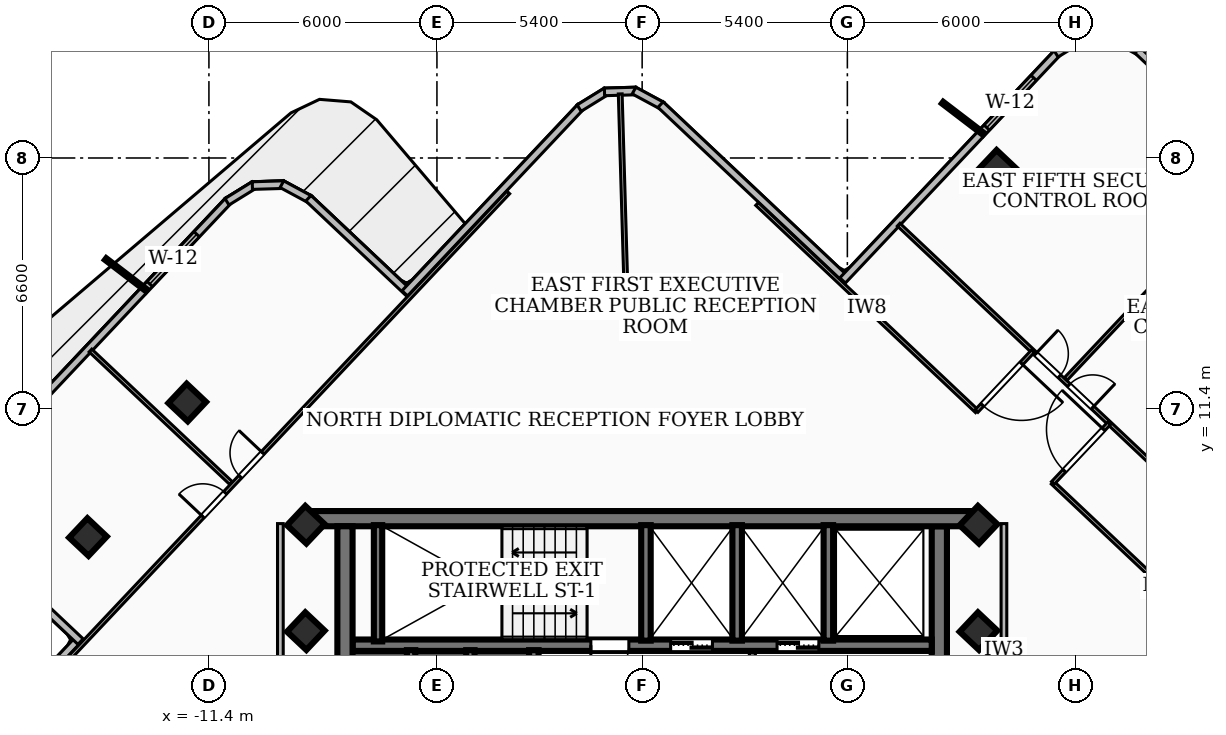
"""IFC4 building model, lengths in metres.
Left out: names, types, materials, properties, quantities, classifications, styles, units other than length and angle.
Written with IfcOpenShell. Run it as: python <this file> out.ifc"""

import sys

from ifc_helpers import new_model, si_unit, direction, frame, frame_2d, origin, origin_2d, place, context, subcontext, project, spatial, rectangle, extrude, element, fill, save


model = new_model("IFC4")
c1 = context("Model", 3, precision=1e-05, world=origin(), true_north=direction((0.0, 1.0)))
c2 = subcontext(c1, "Body", "Model", "MODEL_VIEW")
j1 = project(units=[si_unit("LENGTHUNIT", "METRE"), si_unit("PLANEANGLEUNIT", "RADIAN")], contexts=[c1])
p1 = place(None, origin())
s1 = spatial("IfcSite", under=j1, at=p1, CompositionType="ELEMENT")
p2 = place(p1, origin())
s2 = spatial("IfcBuilding", under=s1, at=p2, CompositionType="ELEMENT")
p3 = place(p2, frame((0.0, 0.0, 244.08)))
s3 = spatial("IfcBuildingStorey", under=s2, at=p3, CompositionType="ELEMENT", Elevation=244.08)
p4 = place(p3, frame((-8.78, 8.51, 0.0), z_axis=(0.0, 0.0, 1.0), x_axis=(1.0, 0.0, 0.0)))
e1 = element("IfcWall", 1, at=p4, inside=s3, PredefinedType="SHEAR", context=c2, shape_type="SweptSolid", body=[
    extrude(rectangle(XDim=17.56, YDim=0.4, at=frame_2d((8.78, 0.0))), origin(), (0.0, 0.0, 1.0), 3.16),
])
for number, where, z_axis, x_axis in (
    (2, (-7.82, 1.95, 0.0), (0.0, 0.0, 1.0), (0.0, 1.0, 0.0)),
    (3, (7.82, 8.31, 0.0), (0.0, 0.0, 1.0), (0.0, -1.0, 0.0)),
):
    element("IfcWall", number, at=place(p3, frame(where, z_axis=z_axis, x_axis=x_axis)), inside=s3, PredefinedType="SHEAR", context=c2, shape_type="SweptSolid", body=[
        extrude(rectangle(XDim=6.36, YDim=0.4, at=frame_2d((3.18, 0.0))), origin(), (0.0, 0.0, 1.0), 3.16),
    ])
p5 = place(p3, frame((7.62, 5.18, 0.0), z_axis=(0.0, 0.0, 1.0), x_axis=(-1.0, 0.0, 0.0)))
e4 = element("IfcWall", 4, at=p5, inside=s3, PredefinedType="SOLIDWALL", context=c2, shape_type="SweptSolid", body=[
    extrude(rectangle(XDim=15.24, YDim=0.3, at=frame_2d((7.62, 0.0))), origin(), (0.0, 0.0, 1.0), 3.16),
])
p6 = place(p5, frame((5.77, 0.0, 0.0)))
e5 = element("IfcOpeningElement", 5, at=p6, cuts=e4, PredefinedType="OPENING", context=c2, shape_type="SweptSolid", body=[
    extrude(rectangle(XDim=1.1, YDim=2.15, at=frame_2d((0.55, 1.075))), frame((0.0, 0.16, 0.0), z_axis=(0.0, -1.0, 0.0), x_axis=(1.0, 0.0, 0.0)), (0.0, 0.0, 1.0), 0.32),
])
p7 = place(p5, frame((2.97, 0.0, 0.0)))
e6 = element("IfcOpeningElement", 6, at=p7, cuts=e4, PredefinedType="OPENING", context=c2, shape_type="SweptSolid", body=[
    extrude(rectangle(XDim=1.1, YDim=2.15, at=frame_2d((0.55, 1.075))), frame((0.0, 0.16, 0.0), z_axis=(0.0, -1.0, 0.0), x_axis=(1.0, 0.0, 0.0)), (0.0, 0.0, 1.0), 0.32),
])
p8 = place(p5, frame((7.97, 0.0, 0.0)))
e7 = element("IfcOpeningElement", 7, at=p8, cuts=e4, PredefinedType="OPENING", context=c2, shape_type="SweptSolid", body=[
    extrude(rectangle(XDim=1.0, YDim=2.1, at=frame_2d((0.5, 1.05))), frame((0.0, 0.16, 0.0), z_axis=(0.0, -1.0, 0.0), x_axis=(1.0, 0.0, 0.0)), (0.0, 0.0, 1.0), 0.32),
])
p9 = place(p3, frame((-6.95, 5.28, 0.0), z_axis=(0.0, 0.0, 1.0), x_axis=(0.0, 1.0, 0.0)))
e8 = element("IfcWall", 8, at=p9, inside=s3, PredefinedType="SOLIDWALL", context=c2, shape_type="SweptSolid", body=[
    extrude(rectangle(XDim=3.06, YDim=0.22, at=frame_2d((1.53, 0.0))), origin(), (0.0, 0.0, 1.0), 3.16),
])
for number, where, z_axis, x_axis in (
    (9, (0.1, 5.3, 0.0), (0.0, 0.0, 1.0), (0.0, 1.0, 0.0)),
    (10, (2.5, 5.3, 0.0), (0.0, 0.0, 1.0), (0.0, 1.0, 0.0)),
    (11, (4.9, 5.3, 0.0), (0.0, 0.0, 1.0), (0.0, 1.0, 0.0)),
):
    element("IfcWall", number, at=place(p3, frame(where, z_axis=z_axis, x_axis=x_axis)), inside=s3, PredefinedType="SOLIDWALL", context=c2, shape_type="SweptSolid", body=[
        extrude(rectangle(XDim=3.04, YDim=0.25, at=frame_2d((1.52, 0.0))), origin(), (0.0, 0.0, 1.0), 3.16),
    ])
p10 = place(p3, frame((-2.85, 1.98, 0.0), z_axis=(0.0, 0.0, 1.0), x_axis=(0.0, 1.0, 0.0)))
e12 = element("IfcWall", 12, at=p10, inside=s3, PredefinedType="SOLIDWALL", context=c2, shape_type="SweptSolid", body=[
    extrude(rectangle(XDim=3.07, YDim=0.25, at=frame_2d((1.535, 0.0))), origin(), (0.0, 0.0, 1.0), 3.16),
])
for number, where, z_axis, x_axis in (
    (13, (-6.08, 1.98, 0.0), (0.0, 0.0, 1.0), (0.0, 1.0, 0.0)),
    (14, (-4.52, 1.98, 0.0), (0.0, 0.0, 1.0), (0.0, 1.0, 0.0)),
):
    element("IfcWall", number, at=place(p3, frame(where, z_axis=z_axis, x_axis=x_axis)), inside=s3, PredefinedType="SOLIDWALL", context=c2, shape_type="SweptSolid", body=[
        extrude(rectangle(XDim=3.07, YDim=0.22, at=frame_2d((1.535, 0.0))), origin(), (0.0, 0.0, 1.0), 3.16),
    ])
for number, where, z_axis, x_axis in (
    (15, (-8.85, 5.55, 0.0), (0.0, 0.0, 1.0), (0.686, 0.728, 0.0)),
    (16, (8.85, 5.55, 0.0), (0.0, 0.0, 1.0), (0.686, 0.728, 0.0)),
    (17, (-8.85, 8.35, 0.0), (0.0, 0.0, 1.0), (0.686, 0.728, 0.0)),
    (18, (8.85, 8.35, 0.0), (0.0, 0.0, 1.0), (0.686, 0.728, 0.0)),
    (19, (9.341, 17.714, 0.0), (0.0, 0.0, 1.0), (0.686, 0.728, 0.0)),
    (20, (-11.971, 11.566, 0.0), (0.0, 0.0, 1.0), (0.686, 0.728, 0.0)),
    (21, (-14.583, 8.026, 0.0), (0.0, 0.0, 1.0), (0.686, 0.728, 0.0)),
):
    element("IfcColumn", number, at=place(p3, frame(where, z_axis=z_axis, x_axis=x_axis)), inside=s3, PredefinedType="COLUMN", context=c2, shape_type="SweptSolid", body=[
        extrude(rectangle(XDim=0.7, YDim=0.7, at=origin_2d()), origin(), (0.0, 0.0, 1.0), 3.42),
    ])
p11 = place(p3, frame((-19.405, 0.484, 0.0), z_axis=(0.0, 0.0, 1.0), x_axis=(0.686028756372, 0.727574426042, 0.0)))
e22 = element("IfcWall", 22, at=p11, inside=s3, PredefinedType="SOLIDWALL", context=c2, shape_type="SweptSolid", body=[
    extrude(rectangle(XDim=6.74, YDim=0.2, at=frame_2d((3.37, 0.0))), origin(), (0.0, 0.0, 1.0), 3.16),
])
p12 = place(p3, frame((-14.778, 5.275, 0.0), z_axis=(0.0, 0.0, 1.0), x_axis=(-0.727262285553, 0.686359649172, 0.0)))
e23 = element("IfcWall", 23, at=p12, inside=s3, PredefinedType="SOLIDWALL", context=c2, shape_type="SweptSolid", body=[
    extrude(rectangle(XDim=3.641, YDim=0.2, at=frame_2d((1.82, 0.0))), origin(), (0.0, 0.0, 1.0), 3.16),
])
p13 = place(p3, frame((-17.488, 9.878, 0.0), z_axis=(0.0, 0.0, 1.0), x_axis=(0.686075032126, 0.727530789928, 0.0)))
e24 = element("IfcWall", 24, at=p13, inside=s3, PredefinedType="SOLIDWALL", context=c2, shape_type="SweptSolid", body=[
    extrude(rectangle(XDim=9.623, YDim=0.2, at=frame_2d((4.812, 0.0))), origin(), (0.0, 0.0, 1.0), 3.16),
])
p14 = place(p13, frame((6.606, 0.0, 0.85)))
e25 = element("IfcOpeningElement", 25, at=p14, cuts=e24, PredefinedType="OPENING", context=c2, shape_type="SweptSolid", body=[
    extrude(rectangle(XDim=1.8, YDim=1.6, at=frame_2d((0.9, 0.8))), frame((0.0, 0.11, 0.0), z_axis=(0.0, -1.0, 0.0), x_axis=(1.0, 0.0, 0.0)), (0.0, 0.0, 1.0), 0.22),
])
p15 = place(p3, frame((-10.924, 16.848, 0.0), z_axis=(0.0, 0.0, 1.0), x_axis=(0.850947362812, 0.525250974033, 0.0)))
e26 = element("IfcWall", 26, at=p15, inside=s3, PredefinedType="SOLIDWALL", context=c2, shape_type="SweptSolid", body=[
    extrude(rectangle(XDim=0.838, YDim=0.2, at=frame_2d((0.419, 0.0))), origin(), (0.0, 0.0, 1.0), 3.16),
])
p16 = place(p3, frame((-10.257, 17.274, 0.0), z_axis=(0.0, 0.0, 1.0), x_axis=(0.999534635062, 0.03050431627, 0.0)))
e27 = element("IfcWall", 27, at=p16, inside=s3, PredefinedType="SOLIDWALL", context=c2, shape_type="SweptSolid", body=[
    extrude(rectangle(XDim=0.824, YDim=0.2, at=frame_2d((0.412, 0.0))), origin(), (0.0, 0.0, 1.0), 3.16),
])
p17 = place(p3, frame((-9.48, 17.31, 0.0), z_axis=(0.0, 0.0, 1.0), x_axis=(0.880199822755, -0.474603278561, 0.0)))
e28 = element("IfcWall", 28, at=p17, inside=s3, PredefinedType="SOLIDWALL", context=c2, shape_type="SweptSolid", body=[
    extrude(rectangle(XDim=0.838, YDim=0.2, at=frame_2d((0.419, 0.0))), origin(), (0.0, 0.0, 1.0), 3.16),
])
p18 = place(p3, frame((-8.782, 16.941, 0.0), z_axis=(0.0, 0.0, 1.0), x_axis=(0.727388601412, -0.686225781019, 0.0)))
e29 = element("IfcWall", 29, at=p18, inside=s3, PredefinedType="SOLIDWALL", context=c2, shape_type="SweptSolid", body=[
    extrude(rectangle(XDim=3.642, YDim=0.2, at=frame_2d((1.821, 0.0))), origin(), (0.0, 0.0, 1.0), 3.16),
])
p19 = place(p3, frame((-6.246, 14.439, 0.0), z_axis=(0.0, 0.0, 1.0), x_axis=(0.686109803758, 0.727497998064, 0.0)))
e30 = element("IfcWall", 30, at=p19, inside=s3, PredefinedType="SOLIDWALL", context=c2, shape_type="SweptSolid", body=[
    extrude(rectangle(XDim=6.742, YDim=0.2, at=frame_2d((3.371, 0.0))), origin(), (0.0, 0.0, 1.0), 3.16),
])
p20 = place(p3, frame((-1.658, 19.313, 0.0), z_axis=(0.0, 0.0, 1.0), x_axis=(0.850997215859, 0.52517019965, 0.0)))
e31 = element("IfcWall", 31, at=p20, inside=s3, PredefinedType="SOLIDWALL", context=c2, shape_type="SweptSolid", body=[
    extrude(rectangle(XDim=0.838, YDim=0.2, at=frame_2d((0.419, 0.0))), origin(), (0.0, 0.0, 1.0), 3.16),
])
p21 = place(p3, frame((-0.991, 19.739, 0.0), z_axis=(0.0, 0.0, 1.0), x_axis=(0.999578691641, 0.029024803491, 0.0)))
e32 = element("IfcWall", 32, at=p21, inside=s3, PredefinedType="SOLIDWALL", context=c2, shape_type="SweptSolid", body=[
    extrude(rectangle(XDim=0.824, YDim=0.2, at=frame_2d((0.412, 0.0))), origin(), (0.0, 0.0, 1.0), 3.16),
])
p22 = place(p3, frame((-0.214, 19.774, 0.0), z_axis=(0.0, 0.0, 1.0), x_axis=(0.880199822755, -0.474603278561, 0.0)))
e33 = element("IfcWall", 33, at=p22, inside=s3, PredefinedType="SOLIDWALL", context=c2, shape_type="SweptSolid", body=[
    extrude(rectangle(XDim=0.838, YDim=0.2, at=frame_2d((0.419, 0.0))), origin(), (0.0, 0.0, 1.0), 3.16),
])
p23 = place(p3, frame((0.484, 19.405, 0.0), z_axis=(0.0, 0.0, 1.0), x_axis=(0.727574426042, -0.686028756372, 0.0)))
e34 = element("IfcWall", 34, at=p23, inside=s3, PredefinedType="SOLIDWALL", context=c2, shape_type="SweptSolid", body=[
    extrude(rectangle(XDim=6.74, YDim=0.2, at=frame_2d((3.37, 0.0))), origin(), (0.0, 0.0, 1.0), 3.16),
])
p24 = place(p3, frame((5.275, 14.778, 0.0), z_axis=(0.0, 0.0, 1.0), x_axis=(0.686187598971, 0.72742462085, 0.0)))
e35 = element("IfcWall", 35, at=p24, inside=s3, PredefinedType="SOLIDWALL", context=c2, shape_type="SweptSolid", body=[
    extrude(rectangle(XDim=8.241, YDim=0.2, at=frame_2d((4.121, 0.0))), origin(), (0.0, 0.0, 1.0), 3.16),
])
p25 = place(p24, frame((5.528, 0.0, 0.85)))
e36 = element("IfcOpeningElement", 36, at=p25, cuts=e35, PredefinedType="OPENING", context=c2, shape_type="SweptSolid", body=[
    extrude(rectangle(XDim=1.8, YDim=1.6, at=frame_2d((0.9, 0.8))), frame((0.0, 0.11, 0.0), z_axis=(0.0, -1.0, 0.0), x_axis=(1.0, 0.0, 0.0)), (0.0, 0.0, 1.0), 0.22),
])
p26 = place(p3, frame((10.892, 20.742, 0.0), z_axis=(0.0, 0.0, 1.0), x_axis=(0.850997215859, 0.52517019965, 0.0)))
e37 = element("IfcWall", 37, at=p26, inside=s3, PredefinedType="SOLIDWALL", context=c2, shape_type="SweptSolid", body=[
    extrude(rectangle(XDim=0.838, YDim=0.2, at=frame_2d((0.419, 0.0))), origin(), (0.0, 0.0, 1.0), 3.16),
])
p27 = place(p3, frame((12.336, 21.204, 0.0), z_axis=(0.0, 0.0, 1.0), x_axis=(0.880078176624, -0.474828814447, 0.0)))
e38 = element("IfcWall", 38, at=p27, inside=s3, PredefinedType="SOLIDWALL", context=c2, shape_type="SweptSolid", body=[
    extrude(rectangle(XDim=0.839, YDim=0.2, at=frame_2d((0.419, 0.0))), origin(), (0.0, 0.0, 1.0), 3.16),
])
p28 = place(p3, frame((13.034, 20.835, 0.0), z_axis=(0.0, 0.0, 1.0), x_axis=(0.727480137234, -0.686128741513, 0.0)))
e39 = element("IfcWall", 39, at=p28, inside=s3, PredefinedType="SOLIDWALL", context=c2, shape_type="SweptSolid", body=[
    extrude(rectangle(XDim=9.624, YDim=0.2, at=frame_2d((4.812, 0.0))), origin(), (0.0, 0.0, 1.0), 3.16),
])
p29 = place(p28, frame((6.306, 0.0, 0.85)))
e40 = element("IfcOpeningElement", 40, at=p29, cuts=e39, PredefinedType="OPENING", context=c2, shape_type="SweptSolid", body=[
    extrude(rectangle(XDim=2.4, YDim=2.1, at=frame_2d((1.2, 1.05))), frame((0.0, 0.11, 0.0), z_axis=(0.0, -1.0, 0.0), x_axis=(1.0, 0.0, 0.0)), (0.0, 0.0, 1.0), 0.22),
])
p30 = place(p3, frame((2.9, 2.04, 0.0), z_axis=(0.0, 0.0, 1.0), x_axis=(0.0, 1.0, 0.0)))
e41 = element("IfcWall", 41, at=p30, inside=s3, PredefinedType="PARTITIONING", context=c2, shape_type="SweptSolid", body=[
    extrude(rectangle(XDim=2.94, YDim=0.16, at=frame_2d((1.47, 0.0))), origin(), (0.0, 0.0, 1.0), 2.39),
])
p31 = place(p30, frame((1.82, 0.0, 0.0)))
e42 = element("IfcOpeningElement", 42, at=p31, cuts=e41, PredefinedType="OPENING", context=c2, shape_type="SweptSolid", body=[
    extrude(rectangle(XDim=0.9, YDim=2.06, at=frame_2d((0.45, 1.03))), frame((0.0, 0.09, 0.0), z_axis=(0.0, -1.0, 0.0), x_axis=(1.0, 0.0, 0.0)), (0.0, 0.0, 1.0), 0.18),
])
p32 = place(p3, frame((-9.52, 1.75, 0.0), z_axis=(0.0, 0.0, 1.0), x_axis=(0.0, 1.0, 0.0)))
e43 = element("IfcWall", 43, at=p32, inside=s3, PredefinedType="PARTITIONING", context=c2, shape_type="SweptSolid", body=[
    extrude(rectangle(XDim=6.63, YDim=0.15, at=frame_2d((3.315, 0.0))), origin(), (0.0, 0.0, 1.0), 2.53),
])
p33 = place(p3, frame((9.52, 1.75, 0.0), z_axis=(0.0, 0.0, 1.0), x_axis=(0.0, 1.0, 0.0)))
e44 = element("IfcWall", 44, at=p33, inside=s3, PredefinedType="PARTITIONING", context=c2, shape_type="SweptSolid", body=[
    extrude(rectangle(XDim=6.63, YDim=0.15, at=frame_2d((3.315, 0.0))), origin(), (0.0, 0.0, 1.0), 3.16),
])
p34 = place(p3, frame((-0.397, 13.54, 0.0), z_axis=(0.0, 0.0, 1.0), x_axis=(-0.029263699144, 0.999571726247, 0.0)))
e45 = element("IfcWall", 45, at=p34, inside=s3, PredefinedType="PARTITIONING", context=c2, shape_type="SweptSolid", body=[
    extrude(rectangle(XDim=6.149, YDim=0.1, at=frame_2d((3.074, 0.0))), origin(), (0.0, 0.0, 1.0), 3.16),
])
p35 = place(p3, frame((8.807, 11.336, 0.0), z_axis=(0.0, 0.0, 1.0), x_axis=(-0.727546923281, 0.68605792352, 0.0)))
e46 = element("IfcWall", 46, at=p35, inside=s3, PredefinedType="PARTITIONING", context=c2, shape_type="SweptSolid", body=[
    extrude(rectangle(XDim=7.95, YDim=0.1, at=frame_2d((3.975, 0.0))), origin(), (0.0, 0.0, 1.0), 3.16),
])
p36 = place(p3, frame((16.585, 4.002, 0.0), z_axis=(0.0, 0.0, 1.0), x_axis=(-0.727485611578, 0.686122937196, 0.0)))
e47 = element("IfcWall", 47, at=p36, inside=s3, PredefinedType="PARTITIONING", context=c2, shape_type="SweptSolid", body=[
    extrude(rectangle(XDim=7.951, YDim=0.1, at=frame_2d((3.975, 0.0))), origin(), (0.0, 0.0, 1.0), 3.16),
])
p37 = place(p3, frame((10.282, 12.915, 0.0), z_axis=(0.0, 0.0, 1.0), x_axis=(-0.685949623464, -0.727649032205, 0.0)))
e48 = element("IfcWall", 48, at=p37, inside=s3, PredefinedType="PARTITIONING", context=c2, shape_type="SweptSolid", body=[
    extrude(rectangle(XDim=2.16, YDim=0.1, at=frame_2d((1.08, 0.0))), origin(), (0.0, 0.0, 1.0), 2.53),
])
p38 = place(p37, frame((0.44, 0.0, 0.0)))
e49 = element("IfcOpeningElement", 49, at=p38, cuts=e48, PredefinedType="OPENING", context=c2, shape_type="SweptSolid", body=[
    extrude(rectangle(XDim=1.5, YDim=2.12, at=frame_2d((0.75, 1.06))), frame((0.0, 0.06, 0.0), z_axis=(0.0, -1.0, 0.0), x_axis=(1.0, 0.0, 0.0)), (0.0, 0.0, 1.0), 0.12),
])
p39 = place(p3, frame((10.808, 9.45, 0.0), z_axis=(0.0, 0.0, 1.0), x_axis=(0.686175284747, 0.727436236795, 0.0)))
e50 = element("IfcWall", 50, at=p39, inside=s3, PredefinedType="PARTITIONING", context=c2, shape_type="SweptSolid", body=[
    extrude(rectangle(XDim=2.16, YDim=0.1, at=frame_2d((1.08, 0.0))), origin(), (0.0, 0.0, 1.0), 3.16),
])
p40 = place(p39, frame((0.44, 0.0, 0.0)))
e51 = element("IfcOpeningElement", 51, at=p40, cuts=e50, PredefinedType="OPENING", context=c2, shape_type="SweptSolid", body=[
    extrude(rectangle(XDim=1.5, YDim=2.12, at=frame_2d((0.75, 1.06))), frame((0.0, 0.06, 0.0), z_axis=(0.0, -1.0, 0.0), x_axis=(1.0, 0.0, 0.0)), (0.0, 0.0, 1.0), 0.12),
])
p41 = place(p3, frame((11.145, 12.183, 0.0), z_axis=(0.0, 0.0, 1.0), x_axis=(0.686088923395, 0.727517689953, 0.0)))
e52 = element("IfcWall", 52, at=p41, inside=s3, PredefinedType="PARTITIONING", context=c2, shape_type="SweptSolid", body=[
    extrude(rectangle(XDim=7.525, YDim=0.1, at=frame_2d((3.763, 0.0))), origin(), (0.0, 0.0, 1.0), 3.16),
])
p42 = place(p3, frame((6.75, 16.246, 0.0), z_axis=(0.0, 0.0, 1.0), x_axis=(0.727488049341, -0.686120352464, 0.0)))
e53 = element("IfcWall", 53, at=p42, inside=s3, PredefinedType="PARTITIONING", context=c2, shape_type="SweptSolid", body=[
    extrude(rectangle(XDim=12.47, YDim=0.1, at=frame_2d((6.235, 0.0))), origin(), (0.0, 0.0, 1.0), 2.53),
])
p43 = place(p42, frame((6.155, 0.0, 0.0)))
e54 = element("IfcOpeningElement", 54, at=p43, cuts=e53, PredefinedType="OPENING", context=c2, shape_type="SweptSolid", body=[
    extrude(rectangle(XDim=0.86, YDim=2.04, at=frame_2d((0.43, 1.02))), frame((0.0, 0.06, 0.0), z_axis=(0.0, -1.0, 0.0), x_axis=(1.0, 0.0, 0.0)), (0.0, 0.0, 1.0), 0.12),
])
p44 = place(p42, frame((4.955, 0.0, 0.0)))
e55 = element("IfcOpeningElement", 55, at=p44, cuts=e53, PredefinedType="OPENING", context=c2, shape_type="SweptSolid", body=[
    extrude(rectangle(XDim=0.86, YDim=2.04, at=frame_2d((0.43, 1.02))), frame((0.0, 0.06, 0.0), z_axis=(0.0, -1.0, 0.0), x_axis=(1.0, 0.0, 0.0)), (0.0, 0.0, 1.0), 0.12),
])
p45 = place(p3, frame((-10.817, 9.445, 0.0), z_axis=(0.0, 0.0, 1.0), x_axis=(-0.727564075469, 0.686039733606, 0.0)))
e56 = element("IfcWall", 56, at=p45, inside=s3, PredefinedType="PARTITIONING", context=c2, shape_type="SweptSolid", body=[
    extrude(rectangle(XDim=5.086, YDim=0.1, at=frame_2d((2.543, 0.0))), origin(), (0.0, 0.0, 1.0), 3.16),
])
p46 = place(p3, frame((-17.271, 2.514, 0.0), z_axis=(0.0, 0.0, 1.0), x_axis=(0.686068145865, 0.727537283739, 0.0)))
e57 = element("IfcWall", 57, at=p46, inside=s3, PredefinedType="PARTITIONING", context=c2, shape_type="SweptSolid", body=[
    extrude(rectangle(XDim=20.04, YDim=0.1, at=frame_2d((10.02, 0.0))), origin(), (0.0, 0.0, 1.0), 2.53),
])
p47 = place(p46, frame((9.76, 0.0, 0.0)))
e58 = element("IfcOpeningElement", 58, at=p47, cuts=e57, PredefinedType="OPENING", context=c2, shape_type="SweptSolid", body=[
    extrude(rectangle(XDim=0.86, YDim=2.04, at=frame_2d((0.43, 1.02))), frame((0.0, 0.06, 0.0), z_axis=(0.0, -1.0, 0.0), x_axis=(1.0, 0.0, 0.0)), (0.0, 0.0, 1.0), 0.12),
])
p48 = place(p46, frame((8.32, 0.0, 0.0)))
e59 = element("IfcOpeningElement", 59, at=p48, cuts=e57, PredefinedType="OPENING", context=c2, shape_type="SweptSolid", body=[
    extrude(rectangle(XDim=0.86, YDim=2.04, at=frame_2d((0.43, 1.02))), frame((0.0, 0.06, 0.0), z_axis=(0.0, -1.0, 0.0), x_axis=(1.0, 0.0, 0.0)), (0.0, 0.0, 1.0), 0.12),
])
p49 = place(p14, origin())
e60 = element("IfcWindow", 60, at=p49, inside=s3, PartitioningType="SINGLE_PANEL", PredefinedType="WINDOW", context=c2, shape_type="SweptSolid", body=[
    extrude(rectangle(XDim=1.8, YDim=1.6, at=frame_2d((0.9, 0.8))), frame((0.0, 0.03, 0.0), z_axis=(0.0, -1.0, 0.0), x_axis=(1.0, 0.0, 0.0)), (0.0, 0.0, 1.0), 0.06),
])
fill(e25, e60)
p50 = place(p25, origin())
e61 = element("IfcWindow", 61, at=p50, inside=s3, PartitioningType="SINGLE_PANEL", PredefinedType="WINDOW", context=c2, shape_type="SweptSolid", body=[
    extrude(rectangle(XDim=1.8, YDim=1.6, at=frame_2d((0.9, 0.8))), frame((0.0, 0.03, 0.0), z_axis=(0.0, -1.0, 0.0), x_axis=(1.0, 0.0, 0.0)), (0.0, 0.0, 1.0), 0.06),
])
fill(e36, e61)
p51 = place(p6, origin())
e62 = element("IfcDoor", 62, at=p51, inside=s3, OperationType="DOUBLE_DOOR_SLIDING", PredefinedType="DOOR", context=c2, shape_type="SweptSolid", body=[
    extrude(rectangle(XDim=1.1, YDim=2.15, at=frame_2d((0.55, 1.075))), frame((0.0, 0.025, 0.0), z_axis=(0.0, -1.0, 0.0), x_axis=(1.0, 0.0, 0.0)), (0.0, 0.0, 1.0), 0.05),
])
fill(e5, e62)
p52 = place(p7, origin())
e63 = element("IfcDoor", 63, at=p52, inside=s3, OperationType="DOUBLE_DOOR_SLIDING", PredefinedType="DOOR", context=c2, shape_type="SweptSolid", body=[
    extrude(rectangle(XDim=1.1, YDim=2.15, at=frame_2d((0.55, 1.075))), frame((0.0, 0.025, 0.0), z_axis=(0.0, -1.0, 0.0), x_axis=(1.0, 0.0, 0.0)), (0.0, 0.0, 1.0), 0.05),
])
fill(e6, e63)
p53 = place(p8, origin())
e64 = element("IfcDoor", 64, at=p53, inside=s3, OperationType="SINGLE_SWING_RIGHT", PredefinedType="DOOR", context=c2, shape_type="SweptSolid", body=[
    extrude(rectangle(XDim=1.0, YDim=2.1, at=frame_2d((0.5, 1.05))), frame((0.0, 0.025, 0.0), z_axis=(0.0, -1.0, 0.0), x_axis=(1.0, 0.0, 0.0)), (0.0, 0.0, 1.0), 0.05),
])
fill(e7, e64)
p54 = place(p38, origin())
e65 = element("IfcDoor", 65, at=p54, inside=s3, OperationType="SINGLE_SWING_LEFT", PredefinedType="DOOR", context=c2, shape_type="SweptSolid", body=[
    extrude(rectangle(XDim=1.5, YDim=2.12, at=frame_2d((0.75, 1.06))), frame((0.0, 0.025, 0.0), z_axis=(0.0, -1.0, 0.0), x_axis=(1.0, 0.0, 0.0)), (0.0, 0.0, 1.0), 0.05),
])
fill(e49, e65)
p55 = place(p40, origin())
e66 = element("IfcDoor", 66, at=p55, inside=s3, OperationType="SINGLE_SWING_RIGHT", PredefinedType="DOOR", context=c2, shape_type="SweptSolid", body=[
    extrude(rectangle(XDim=1.5, YDim=2.12, at=frame_2d((0.75, 1.06))), frame((0.0, 0.025, 0.0), z_axis=(0.0, -1.0, 0.0), x_axis=(1.0, 0.0, 0.0)), (0.0, 0.0, 1.0), 0.05),
])
fill(e51, e66)
p56 = place(p43, origin())
e67 = element("IfcDoor", 67, at=p56, inside=s3, OperationType="SINGLE_SWING_RIGHT", PredefinedType="DOOR", context=c2, shape_type="SweptSolid", body=[
    extrude(rectangle(XDim=0.86, YDim=2.04, at=frame_2d((0.43, 1.02))), frame((0.0, 0.025, 0.0), z_axis=(0.0, -1.0, 0.0), x_axis=(1.0, 0.0, 0.0)), (0.0, 0.0, 1.0), 0.05),
])
fill(e54, e67)
p57 = place(p44, origin())
e68 = element("IfcDoor", 68, at=p57, inside=s3, OperationType="SINGLE_SWING_LEFT", PredefinedType="DOOR", context=c2, shape_type="SweptSolid", body=[
    extrude(rectangle(XDim=0.86, YDim=2.04, at=frame_2d((0.43, 1.02))), frame((0.0, 0.025, 0.0), z_axis=(0.0, -1.0, 0.0), x_axis=(1.0, 0.0, 0.0)), (0.0, 0.0, 1.0), 0.05),
])
fill(e55, e68)
p58 = place(p47, origin())
e69 = element("IfcDoor", 69, at=p58, inside=s3, OperationType="SINGLE_SWING_RIGHT", PredefinedType="DOOR", context=c2, shape_type="SweptSolid", body=[
    extrude(rectangle(XDim=0.86, YDim=2.04, at=frame_2d((0.43, 1.02))), frame((0.0, 0.025, 0.0), z_axis=(0.0, -1.0, 0.0), x_axis=(1.0, 0.0, 0.0)), (0.0, 0.0, 1.0), 0.05),
])
fill(e58, e69)
p59 = place(p48, origin())
e70 = element("IfcDoor", 70, at=p59, inside=s3, OperationType="SINGLE_SWING_LEFT", PredefinedType="DOOR", context=c2, shape_type="SweptSolid", body=[
    extrude(rectangle(XDim=0.86, YDim=2.04, at=frame_2d((0.43, 1.02))), frame((0.0, 0.025, 0.0), z_axis=(0.0, -1.0, 0.0), x_axis=(1.0, 0.0, 0.0)), (0.0, 0.0, 1.0), 0.05),
])
fill(e59, e70)
save(model, sys.argv[1])
